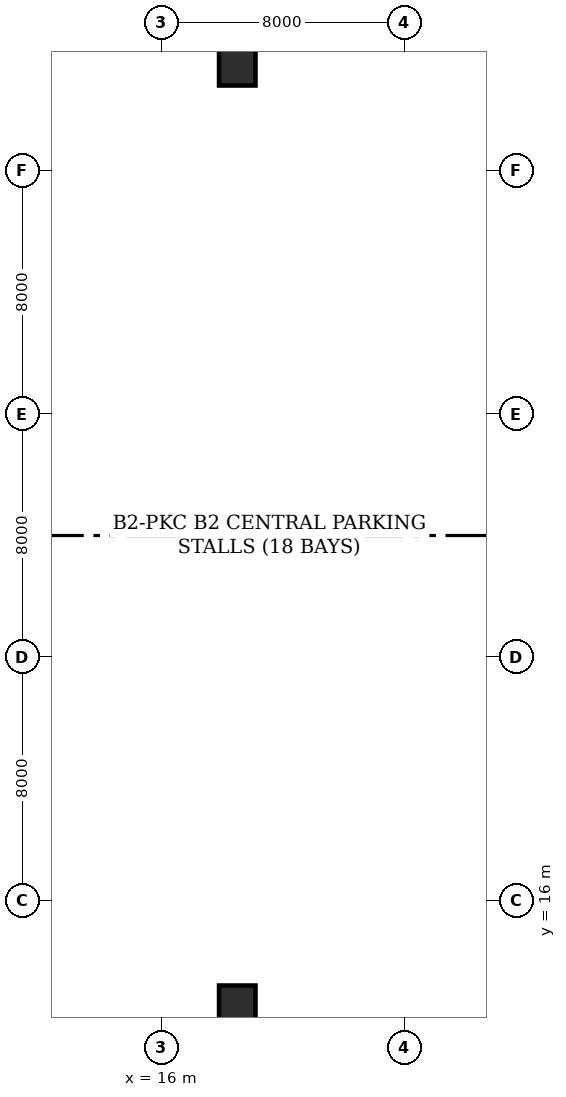
"""IFC4 building model, lengths in metres.
Left out: names, types, materials, properties, quantities, classifications, styles, units other than length and angle.
Written with IfcOpenShell. Run it as: python <this file> out.ifc"""

import sys

from ifc_helpers import new_model, si_unit, direction, frame, origin, origin_2d, place, context, subcontext, project, spatial, hollow_rectangle, extrude, element, save


model = new_model("IFC4")
c1 = context("Model", 3, precision=1e-05, world=origin(), true_north=direction((0.0, 1.0)))
c2 = subcontext(c1, "Body", "Model", "MODEL_VIEW")
j1 = project(units=[si_unit("LENGTHUNIT", "METRE"), si_unit("PLANEANGLEUNIT", "RADIAN")], contexts=[c1])
p1 = place(None, origin())
s1 = spatial("IfcSite", under=j1, at=p1, CompositionType="ELEMENT")
p2 = place(p1, origin())
s2 = spatial("IfcBuilding", under=s1, at=p2, CompositionType="ELEMENT")
p3 = place(p2, frame((0.0, 0.0, -9.0)))
s3 = spatial("IfcBuildingStorey", under=s2, at=p3, CompositionType="ELEMENT", Elevation=-9.0)
for number, where, z_axis, x_axis in (
    (1, (18.5, 12.6, 0.0), (0.0, 0.0, 1.0), (1.0, 0.0, 0.0)),
    (2, (18.5, 43.4, 0.0), (0.0, 0.0, 1.0), (1.0, 0.0, 0.0)),
):
    element("IfcColumn", number, at=place(p3, frame(where, z_axis=z_axis, x_axis=x_axis)), inside=s3, PredefinedType="COLUMN", context=c2, shape_type="SweptSolid", body=[
        extrude(hollow_rectangle(XDim=1.2, YDim=1.2, WallThickness=0.06, at=origin_2d()), origin(), (0.0, 0.0, 1.0), 4.5),
    ])
save(model, sys.argv[1])
